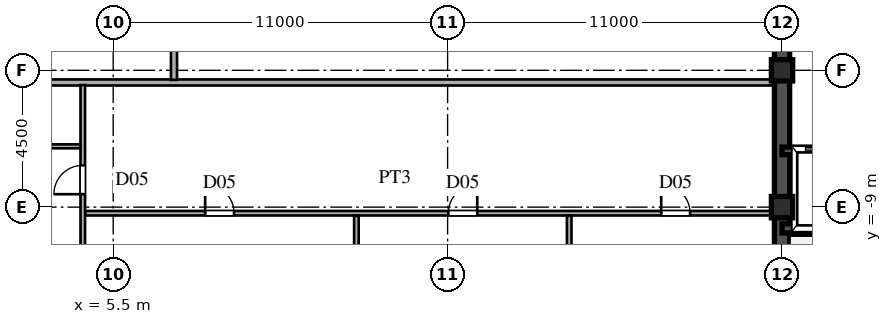
"""IFC4 building model, lengths in metres.
Left out: names, types, materials, properties, quantities, classifications, styles, units other than length and angle.
Written with IfcOpenShell. Run it as: python <this file> out.ifc"""

import sys

from ifc_helpers import new_model, si_unit, direction, frame, frame_2d, origin, origin_2d, place, context, subcontext, project, spatial, rectangle, hollow_rectangle, extrude, source, transform, mapped, element, fill, save


model = new_model("IFC4")
c1 = context("Model", 3, precision=1e-05, world=origin(), true_north=direction((0.0, 1.0)))
c2 = subcontext(c1, "Body", "Model", "MODEL_VIEW")
j1 = project(units=[si_unit("LENGTHUNIT", "METRE"), si_unit("PLANEANGLEUNIT", "RADIAN")], contexts=[c1])
p1 = place(None, origin())
s1 = spatial("IfcSite", under=j1, at=p1, CompositionType="ELEMENT")
p2 = place(p1, origin())
s2 = spatial("IfcBuilding", under=s1, at=p2, CompositionType="ELEMENT")
p3 = place(p2, frame((0.0, 0.0, 258.15)))
s3 = spatial("IfcBuildingStorey", under=s2, at=p3, CompositionType="ELEMENT", Elevation=258.15)
m1 = source(origin(), c2, "Body", "SweptSolid", [
    extrude(hollow_rectangle(XDim=0.7, YDim=0.7, WallThickness=0.03, at=origin_2d()), origin(), (0.0, 0.0, 1.0), 3.75),
])
for number, where, z_axis, x_axis in (
    (1, (27.5, -9.0, 0.0), (0.0, 0.0, 1.0), (1.0, 0.0, 0.0)),
    (2, (27.5, -4.5, 0.0), (0.0, 0.0, 1.0), (1.0, 0.0, 0.0)),
):
    element("IfcColumn", number, at=place(p3, frame(where, z_axis=z_axis, x_axis=x_axis)), inside=s3, PredefinedType="COLUMN", context=c2, shape_type="MappedRepresentation", body=[
        mapped(m1, transform((0.0, 0.0, 0.0), scale=1.0)),
    ])
p4 = place(p3, frame((27.5, -13.5, 0.0), z_axis=(0.0, 0.0, 1.0), x_axis=(0.0, 1.0, 0.0)))
e3 = element("IfcWall", 3, at=p4, inside=s3, PredefinedType="SHEAR", context=c2, shape_type="SweptSolid", body=[
    extrude(rectangle(XDim=12.2, YDim=0.5, at=frame_2d((6.1, 0.0))), origin(), (0.0, 0.0, 1.0), 3.53),
])
p5 = place(p3, frame((27.5, -9.7, 0.0), z_axis=(0.0, 0.0, 1.0), x_axis=(1.0, 0.0, 0.0)))
e4 = element("IfcWall", 4, at=p5, inside=s3, PredefinedType="SHEAR", context=c2, shape_type="SweptSolid", body=[
    extrude(rectangle(XDim=9.0, YDim=0.3, at=frame_2d((4.5, 0.0))), origin(), (0.0, 0.0, 1.0), 3.53),
])
p6 = place(p5, frame((7.3, 0.0, 0.0)))
e5 = element("IfcOpeningElement", 5, at=p6, cuts=e4, PredefinedType="OPENING", context=c2, shape_type="SweptSolid", body=[
    extrude(rectangle(XDim=1.1, YDim=2.2, at=frame_2d((0.55, 1.1))), frame((0.0, 0.16, 0.0), z_axis=(0.0, -1.0, 0.0), x_axis=(1.0, 0.0, 0.0)), (0.0, 0.0, 1.0), 0.32),
])
p7 = place(p3, frame((27.5, -7.15, 0.0), z_axis=(0.0, 0.0, 1.0), x_axis=(1.0, 0.0, 0.0)))
e6 = element("IfcWall", 6, at=p7, inside=s3, PredefinedType="SHEAR", context=c2, shape_type="SweptSolid", body=[
    extrude(rectangle(XDim=2.8, YDim=0.25, at=frame_2d((1.4, 0.0))), origin(), (0.0, 0.0, 1.0), 3.53),
])
p8 = place(p3, frame((4.585, -9.2, 0.0), z_axis=(0.0, 0.0, 1.0), x_axis=(1.0, 0.0, 0.0)))
e7 = element("IfcWall", 7, at=p8, inside=s3, PredefinedType="PARTITIONING", context=c2, shape_type="SweptSolid", body=[
    extrude(rectangle(XDim=22.66, YDim=0.15, at=frame_2d((11.33, 0.0))), origin(), (0.0, 0.0, 1.0), 3.53),
])
p9 = place(p8, frame((3.94, 0.0, 0.0)))
e8 = element("IfcOpeningElement", 8, at=p9, cuts=e7, PredefinedType="OPENING", context=c2, shape_type="SweptSolid", body=[
    extrude(rectangle(XDim=0.95, YDim=2.15, at=frame_2d((0.475, 1.075))), frame((0.0, 0.085, 0.0), z_axis=(0.0, -1.0, 0.0), x_axis=(1.0, 0.0, 0.0)), (0.0, 0.0, 1.0), 0.17),
])
p10 = place(p8, frame((11.94, 0.0, 0.0)))
e9 = element("IfcOpeningElement", 9, at=p10, cuts=e7, PredefinedType="OPENING", context=c2, shape_type="SweptSolid", body=[
    extrude(rectangle(XDim=0.95, YDim=2.15, at=frame_2d((0.475, 1.075))), frame((0.0, 0.085, 0.0), z_axis=(0.0, -1.0, 0.0), x_axis=(1.0, 0.0, 0.0)), (0.0, 0.0, 1.0), 0.17),
])
p11 = place(p8, frame((18.94, 0.0, 0.0)))
e10 = element("IfcOpeningElement", 10, at=p11, cuts=e7, PredefinedType="OPENING", context=c2, shape_type="SweptSolid", body=[
    extrude(rectangle(XDim=0.95, YDim=2.15, at=frame_2d((0.475, 1.075))), frame((0.0, 0.085, 0.0), z_axis=(0.0, -1.0, 0.0), x_axis=(1.0, 0.0, 0.0)), (0.0, 0.0, 1.0), 0.17),
])
p12 = place(p3, frame((-0.915, -7.0, 0.0), z_axis=(0.0, 0.0, 1.0), x_axis=(1.0, 0.0, 0.0)))
e11 = element("IfcWall", 11, at=p12, inside=s3, PredefinedType="PARTITIONING", context=c2, shape_type="SweptSolid", body=[
    extrude(rectangle(XDim=5.33, YDim=0.13, at=frame_2d((2.665, 0.0))), origin(), (0.0, 0.0, 1.0), 3.53),
])
p13 = place(p3, frame((-27.245, -4.9, 0.0), z_axis=(0.0, 0.0, 1.0), x_axis=(1.0, 0.0, 0.0)))
e12 = element("IfcWall", 12, at=p13, inside=s3, PredefinedType="PARTITIONING", context=c2, shape_type="SweptSolid", body=[
    extrude(rectangle(XDim=54.49, YDim=0.2, at=frame_2d((27.245, 0.0))), origin(), (0.0, 0.0, 1.0), 3.53),
])
p14 = place(p13, frame((22.47, 0.0, 0.0)))
e13 = element("IfcOpeningElement", 13, at=p14, cuts=e12, PredefinedType="OPENING", context=c2, shape_type="SweptSolid", body=[
    extrude(rectangle(XDim=1.05, YDim=2.25, at=frame_2d((0.525, 1.125))), frame((0.0, 0.11, 0.0), z_axis=(0.0, -1.0, 0.0), x_axis=(1.0, 0.0, 0.0)), (0.0, 0.0, 1.0), 0.22),
])
p15 = place(p3, frame((4.5, -13.5, 0.0), z_axis=(0.0, 0.0, 1.0), x_axis=(0.0, 1.0, 0.0)))
e14 = element("IfcWall", 14, at=p15, inside=s3, PredefinedType="PARTITIONING", context=c2, shape_type="SweptSolid", body=[
    extrude(rectangle(XDim=8.515, YDim=0.15, at=frame_2d((4.257, 0.0))), origin(), (0.0, 0.0, 1.0), 3.53),
])
p16 = place(p15, frame((4.925, 0.0, 0.0)))
e15 = element("IfcOpeningElement", 15, at=p16, cuts=e14, PredefinedType="OPENING", context=c2, shape_type="SweptSolid", body=[
    extrude(rectangle(XDim=0.95, YDim=2.15, at=frame_2d((0.475, 1.075))), frame((0.0, 0.085, 0.0), z_axis=(0.0, -1.0, 0.0), x_axis=(1.0, 0.0, 0.0)), (0.0, 0.0, 1.0), 0.17),
])
p17 = place(p3, frame((7.5, -4.815, 0.0), z_axis=(0.0, 0.0, 1.0), x_axis=(0.0, 1.0, 0.0)))
e16 = element("IfcWall", 16, at=p17, inside=s3, PredefinedType="PARTITIONING", context=c2, shape_type="SweptSolid", body=[
    extrude(rectangle(XDim=3.38, YDim=0.2, at=frame_2d((1.69, 0.0))), origin(), (0.0, 0.0, 1.0), 3.53),
])
for number, where, z_axis, x_axis in (
    (17, (13.5, -13.5, 0.0), (0.0, 0.0, 1.0), (0.0, 1.0, 0.0)),
    (18, (20.5, -13.5, 0.0), (0.0, 0.0, 1.0), (0.0, 1.0, 0.0)),
):
    element("IfcWall", number, at=place(p3, frame(where, z_axis=z_axis, x_axis=x_axis)), inside=s3, PredefinedType="PARTITIONING", context=c2, shape_type="SweptSolid", body=[
        extrude(rectangle(XDim=4.215, YDim=0.15, at=frame_2d((2.107, 0.0))), origin(), (0.0, 0.0, 1.0), 3.53),
    ])
m2 = source(origin(), c2, "Body", "SweptSolid", [
    extrude(rectangle(XDim=0.95, YDim=2.15, at=frame_2d((0.475, 1.075))), frame((0.0, 0.025, 0.0), z_axis=(0.0, -1.0, 0.0), x_axis=(1.0, 0.0, 0.0)), (0.0, 0.0, 1.0), 0.05),
])
p18 = place(p9, origin())
e19 = element("IfcDoor", 19, at=p18, inside=s3, OperationType="SINGLE_SWING_LEFT", PredefinedType="DOOR", context=c2, shape_type="MappedRepresentation", body=[
    mapped(m2, transform((0.0, 0.0, 0.0), scale=1.0)),
])
fill(e8, e19)
p19 = place(p10, origin())
e20 = element("IfcDoor", 20, at=p19, inside=s3, OperationType="SINGLE_SWING_RIGHT", PredefinedType="DOOR", context=c2, shape_type="MappedRepresentation", body=[
    mapped(m2, transform((0.0, 0.0, 0.0), scale=1.0)),
])
fill(e9, e20)
p20 = place(p11, origin())
e21 = element("IfcDoor", 21, at=p20, inside=s3, OperationType="SINGLE_SWING_LEFT", PredefinedType="DOOR", context=c2, shape_type="MappedRepresentation", body=[
    mapped(m2, transform((0.0, 0.0, 0.0), scale=1.0)),
])
fill(e10, e21)
p21 = place(p16, origin())
e22 = element("IfcDoor", 22, at=p21, inside=s3, OperationType="SINGLE_SWING_LEFT", PredefinedType="DOOR", context=c2, shape_type="MappedRepresentation", body=[
    mapped(m2, transform((0.0, 0.0, 0.0), scale=1.0)),
])
fill(e15, e22)
save(model, sys.argv[1])
